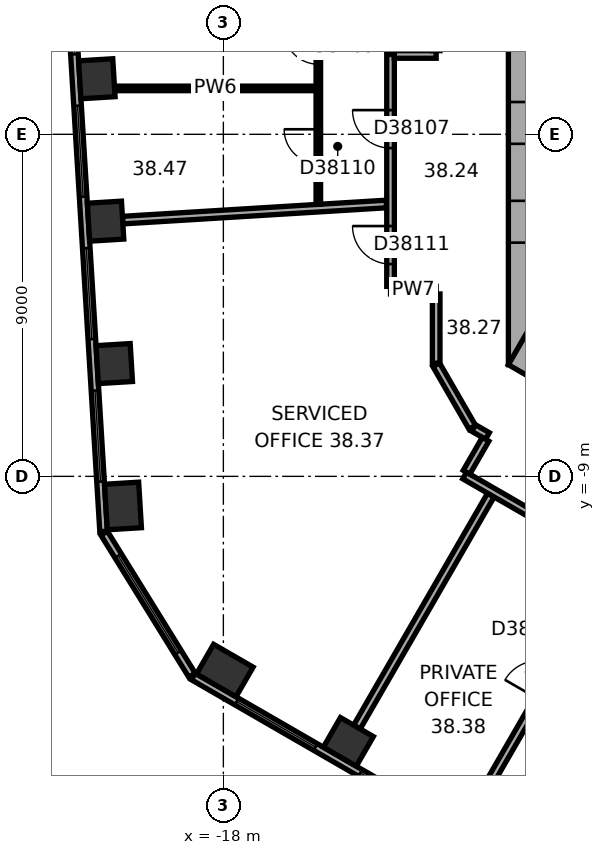
"""IFC4 building model, lengths in metres.
Left out: names, types, materials, properties, quantities, classifications, styles, units other than length and angle.
Written with IfcOpenShell. Run it as: python <this file> out.ifc"""

import sys

from ifc_helpers import new_model, si_unit, direction, frame, frame_2d, origin, origin_2d, place, context, subcontext, project, spatial, rectangle, extrude, element, fill, save


model = new_model("IFC4")
c1 = context("Model", 3, precision=1e-05, world=origin(), true_north=direction((0.0, 1.0)))
c2 = subcontext(c1, "Body", "Model", "MODEL_VIEW")
j1 = project(units=[si_unit("LENGTHUNIT", "METRE"), si_unit("PLANEANGLEUNIT", "RADIAN")], contexts=[c1])
p1 = place(None, origin())
s1 = spatial("IfcSite", under=j1, at=p1, CompositionType="ELEMENT")
p2 = place(p1, origin())
s2 = spatial("IfcBuilding", under=s1, at=p2, CompositionType="ELEMENT")
p3 = place(p2, frame((0.0, 0.0, 157.7)))
s3 = spatial("IfcBuildingStorey", under=s2, at=p3, CompositionType="ELEMENT", Elevation=157.7)
for number, where, z_axis, x_axis in (
    (1, (-21.329, 1.462, 0.0), (0.0, 0.0, 1.0), (0.061, -0.998, 0.0)),
    (2, (-21.1, -2.285, 0.0), (0.0, 0.0, 1.0), (0.061, -0.998, 0.0)),
    (3, (-20.871, -6.032, 0.0), (0.0, 0.0, 1.0), (0.061, -0.998, 0.0)),
):
    element("IfcColumn", number, at=place(p3, frame(where, z_axis=z_axis, x_axis=x_axis)), inside=s3, PredefinedType="COLUMN", context=c2, shape_type="SweptSolid", body=[
        extrude(rectangle(XDim=1.0, YDim=0.9, at=origin_2d()), origin(), (0.0, 0.0, 1.0), 3.7),
    ])
for number, where, z_axis, x_axis in (
    (4, (-20.642, -9.779, 0.0), (0.0, 0.0, 1.0), (0.061, -0.998, 0.0)),
    (5, (-17.962, -14.109, 0.0), (0.0, 0.0, 1.0), (0.866, -0.5, 0.0)),
):
    element("IfcColumn", number, at=place(p3, frame(where, z_axis=z_axis, x_axis=x_axis)), inside=s3, PredefinedType="COLUMN", context=c2, shape_type="SweptSolid", body=[
        extrude(rectangle(XDim=1.2, YDim=0.9, at=origin_2d()), origin(), (0.0, 0.0, 1.0), 3.7),
    ])
p4 = place(p3, frame((-14.711, -15.986, 0.0), z_axis=(0.0, 0.0, 1.0), x_axis=(0.866025403784, -0.5, 0.0)))
e6 = element("IfcColumn", 6, at=p4, inside=s3, PredefinedType="COLUMN", context=c2, shape_type="SweptSolid", body=[
    extrude(rectangle(XDim=1.0, YDim=0.9, at=origin_2d()), origin(), (0.0, 0.0, 1.0), 3.7),
])
p5 = place(p3, frame((-10.0, 6.062, 0.0), z_axis=(0.0, 0.0, 1.0), x_axis=(0.0, -1.0, 0.0)))
e7 = element("IfcWall", 7, at=p5, inside=s3, PredefinedType="SHEAR", context=c2, shape_type="SweptSolid", body=[
    extrude(rectangle(XDim=12.125, YDim=1.0, at=frame_2d((6.062, 0.0))), origin(), (0.0, 0.0, 1.0), 3.7),
])
p6 = place(p5, frame((5.212, 0.0, 0.0)))
e8 = element("IfcOpeningElement", 8, at=p6, cuts=e7, PredefinedType="OPENING", context=c2, shape_type="SweptSolid", body=[
    extrude(rectangle(XDim=1.1, YDim=2.1, at=frame_2d((0.55, 1.05))), frame((0.0, 0.51, 0.0), z_axis=(0.0, -1.0, 0.0), x_axis=(1.0, 0.0, 0.0)), (0.0, 0.0, 1.0), 1.02),
])
p7 = place(p5, frame((7.812, 0.0, 0.0)))
e9 = element("IfcOpeningElement", 9, at=p7, cuts=e7, PredefinedType="OPENING", context=c2, shape_type="SweptSolid", body=[
    extrude(rectangle(XDim=1.1, YDim=2.1, at=frame_2d((0.55, 1.05))), frame((0.0, 0.51, 0.0), z_axis=(0.0, -1.0, 0.0), x_axis=(1.0, 0.0, 0.0)), (0.0, 0.0, 1.0), 1.02),
])
p8 = place(p3, frame((-10.25, -5.629, 0.0), z_axis=(0.0, 0.0, 1.0), x_axis=(0.866022616891, -0.50000482701, 0.0)))
e10 = element("IfcWall", 10, at=p8, inside=s3, PredefinedType="SHEAR", context=c2, shape_type="SweptSolid", body=[
    extrude(rectangle(XDim=12.125, YDim=1.0, at=frame_2d((6.062, 0.0))), origin(), (0.0, 0.0, 1.0), 3.7),
])
p9 = place(p8, frame((6.262, 0.0, 0.0)))
e11 = element("IfcOpeningElement", 11, at=p9, cuts=e10, PredefinedType="OPENING", context=c2, shape_type="SweptSolid", body=[
    extrude(rectangle(XDim=1.5, YDim=2.1, at=frame_2d((0.75, 1.05))), frame((0.0, 0.51, 0.0), z_axis=(0.0, -1.0, 0.0), x_axis=(1.0, 0.0, 0.0)), (0.0, 0.0, 1.0), 1.02),
])
p10 = place(p8, frame((1.712, 0.0, 0.0)))
e12 = element("IfcOpeningElement", 12, at=p10, cuts=e10, PredefinedType="OPENING", context=c2, shape_type="SweptSolid", body=[
    extrude(rectangle(XDim=1.1, YDim=2.1, at=frame_2d((0.55, 1.05))), frame((0.0, 0.51, 0.0), z_axis=(0.0, -1.0, 0.0), x_axis=(1.0, 0.0, 0.0)), (0.0, 0.0, 1.0), 1.02),
])
p11 = place(p8, frame((4.312, 0.0, 0.0)))
e13 = element("IfcOpeningElement", 13, at=p11, cuts=e10, PredefinedType="OPENING", context=c2, shape_type="SweptSolid", body=[
    extrude(rectangle(XDim=1.1, YDim=2.1, at=frame_2d((0.55, 1.05))), frame((0.0, 0.51, 0.0), z_axis=(0.0, -1.0, 0.0), x_axis=(1.0, 0.0, 0.0)), (0.0, 0.0, 1.0), 1.02),
])
p12 = place(p3, frame((-22.375, 9.557, 0.0), z_axis=(0.0, 0.0, 1.0), x_axis=(0.061036015339, -0.998135564356, 0.0)))
e14 = element("IfcWall", 14, at=p12, inside=s3, PredefinedType="STANDARD", context=c2, shape_type="SweptSolid", body=[
    extrude(rectangle(XDim=20.044, YDim=0.2, at=frame_2d((10.022, 0.0))), origin(), (0.0, 0.0, 1.0), 3.7),
])
p13 = place(p12, frame((1.313, 0.0, 0.9)))
e15 = element("IfcOpeningElement", 15, at=p13, cuts=e14, PredefinedType="OPENING", context=c2, shape_type="SweptSolid", body=[
    extrude(rectangle(XDim=2.4, YDim=2.0, at=frame_2d((1.2, 1.0))), frame((0.0, 0.11, 0.0), z_axis=(0.0, -1.0, 0.0), x_axis=(1.0, 0.0, 0.0)), (0.0, 0.0, 1.0), 0.22),
])
p14 = place(p12, frame((5.067, 0.0, 0.9)))
e16 = element("IfcOpeningElement", 16, at=p14, cuts=e14, PredefinedType="OPENING", context=c2, shape_type="SweptSolid", body=[
    extrude(rectangle(XDim=2.4, YDim=2.0, at=frame_2d((1.2, 1.0))), frame((0.0, 0.11, 0.0), z_axis=(0.0, -1.0, 0.0), x_axis=(1.0, 0.0, 0.0)), (0.0, 0.0, 1.0), 0.22),
])
p15 = place(p12, frame((8.821, 0.0, 0.9)))
e17 = element("IfcOpeningElement", 17, at=p15, cuts=e14, PredefinedType="OPENING", context=c2, shape_type="SweptSolid", body=[
    extrude(rectangle(XDim=2.4, YDim=2.0, at=frame_2d((1.2, 1.0))), frame((0.0, 0.11, 0.0), z_axis=(0.0, -1.0, 0.0), x_axis=(1.0, 0.0, 0.0)), (0.0, 0.0, 1.0), 0.22),
])
p16 = place(p12, frame((12.575, 0.0, 0.9)))
e18 = element("IfcOpeningElement", 18, at=p16, cuts=e14, PredefinedType="OPENING", context=c2, shape_type="SweptSolid", body=[
    extrude(rectangle(XDim=2.4, YDim=2.0, at=frame_2d((1.2, 1.0))), frame((0.0, 0.11, 0.0), z_axis=(0.0, -1.0, 0.0), x_axis=(1.0, 0.0, 0.0)), (0.0, 0.0, 1.0), 0.22),
])
p17 = place(p12, frame((16.329, 0.0, 0.9)))
e19 = element("IfcOpeningElement", 19, at=p17, cuts=e14, PredefinedType="OPENING", context=c2, shape_type="SweptSolid", body=[
    extrude(rectangle(XDim=2.4, YDim=2.0, at=frame_2d((1.2, 1.0))), frame((0.0, 0.11, 0.0), z_axis=(0.0, -1.0, 0.0), x_axis=(1.0, 0.0, 0.0)), (0.0, 0.0, 1.0), 0.22),
])
p18 = place(p3, frame((-21.137, -10.496, 0.0), z_axis=(0.0, 0.0, 1.0), x_axis=(0.526178661629, -0.850374044786, 0.0)))
e20 = element("IfcWall", 20, at=p18, inside=s3, PredefinedType="STANDARD", context=c2, shape_type="SweptSolid", body=[
    extrude(rectangle(XDim=4.395, YDim=0.2, at=frame_2d((2.197, 0.0))), origin(), (0.0, 0.0, 1.0), 3.7),
])
p19 = place(p18, frame((0.698, 0.0, 0.9)))
e21 = element("IfcOpeningElement", 21, at=p19, cuts=e20, PredefinedType="OPENING", context=c2, shape_type="SweptSolid", body=[
    extrude(rectangle(XDim=3.0, YDim=2.0, at=frame_2d((1.5, 1.0))), frame((0.0, 0.11, 0.0), z_axis=(0.0, -1.0, 0.0), x_axis=(1.0, 0.0, 0.0)), (0.0, 0.0, 1.0), 0.22),
])
p20 = place(p3, frame((-18.789, -14.267, 0.0), z_axis=(0.0, 0.0, 1.0), x_axis=(0.866023315909, -0.500003616288, 0.0)))
e22 = element("IfcWall", 22, at=p20, inside=s3, PredefinedType="STANDARD", context=c2, shape_type="SweptSolid", body=[
    extrude(rectangle(XDim=20.044, YDim=0.2, at=frame_2d((10.022, 0.0))), origin(), (0.0, 0.0, 1.0), 3.7),
])
p21 = place(p20, frame((1.314, 0.0, 0.9)))
e23 = element("IfcOpeningElement", 23, at=p21, cuts=e22, PredefinedType="OPENING", context=c2, shape_type="SweptSolid", body=[
    extrude(rectangle(XDim=2.4, YDim=2.0, at=frame_2d((1.2, 1.0))), frame((0.0, 0.11, 0.0), z_axis=(0.0, -1.0, 0.0), x_axis=(1.0, 0.0, 0.0)), (0.0, 0.0, 1.0), 0.22),
])
p22 = place(p20, frame((5.069, 0.0, 0.9)))
e24 = element("IfcOpeningElement", 24, at=p22, cuts=e22, PredefinedType="OPENING", context=c2, shape_type="SweptSolid", body=[
    extrude(rectangle(XDim=2.4, YDim=2.0, at=frame_2d((1.2, 1.0))), frame((0.0, 0.11, 0.0), z_axis=(0.0, -1.0, 0.0), x_axis=(1.0, 0.0, 0.0)), (0.0, 0.0, 1.0), 0.22),
])
p23 = place(p20, frame((8.823, 0.0, 0.9)))
e25 = element("IfcOpeningElement", 25, at=p23, cuts=e22, PredefinedType="OPENING", context=c2, shape_type="SweptSolid", body=[
    extrude(rectangle(XDim=2.4, YDim=2.0, at=frame_2d((1.2, 1.0))), frame((0.0, 0.11, 0.0), z_axis=(0.0, -1.0, 0.0), x_axis=(1.0, 0.0, 0.0)), (0.0, 0.0, 1.0), 0.22),
])
p24 = place(p20, frame((12.577, 0.0, 0.9)))
e26 = element("IfcOpeningElement", 26, at=p24, cuts=e22, PredefinedType="OPENING", context=c2, shape_type="SweptSolid", body=[
    extrude(rectangle(XDim=2.4, YDim=2.0, at=frame_2d((1.2, 1.0))), frame((0.0, 0.11, 0.0), z_axis=(0.0, -1.0, 0.0), x_axis=(1.0, 0.0, 0.0)), (0.0, 0.0, 1.0), 0.22),
])
p25 = place(p20, frame((16.331, 0.0, 0.9)))
e27 = element("IfcOpeningElement", 27, at=p25, cuts=e22, PredefinedType="OPENING", context=c2, shape_type="SweptSolid", body=[
    extrude(rectangle(XDim=2.4, YDim=2.0, at=frame_2d((1.2, 1.0))), frame((0.0, 0.11, 0.0), z_axis=(0.0, -1.0, 0.0), x_axis=(1.0, 0.0, 0.0)), (0.0, 0.0, 1.0), 0.22),
])
p26 = place(p3, frame((-20.863, 1.208, 0.0), z_axis=(0.0, 0.0, 1.0), x_axis=(1.0, 0.0, 0.0)))
e28 = element("IfcWall", 28, at=p26, inside=s3, PredefinedType="PARTITIONING", context=c2, shape_type="SweptSolid", body=[
    extrude(rectangle(XDim=5.302, YDim=0.12, at=frame_2d((2.651, 0.0))), origin(), (0.0, 0.0, 1.0), 2.87),
])
p27 = place(p3, frame((-20.651, -2.258, 0.0), z_axis=(0.0, 0.0, 1.0), x_axis=(0.998133960965, 0.061062230286, 0.0)))
e29 = element("IfcWall", 29, at=p27, inside=s3, PredefinedType="PARTITIONING", context=c2, shape_type="SweptSolid", body=[
    extrude(rectangle(XDim=6.953, YDim=0.2, at=frame_2d((3.477, 0.0))), origin(), (0.0, 0.0, 1.0), 3.42),
])
p28 = place(p3, frame((-15.501, 5.479, 0.0), z_axis=(0.0, 0.0, 1.0), x_axis=(0.0, -1.0, 0.0)))
e30 = element("IfcWall", 30, at=p28, inside=s3, PredefinedType="PARTITIONING", context=c2, shape_type="SweptSolid", body=[
    extrude(rectangle(XDim=7.322, YDim=0.12, at=frame_2d((3.661, 0.0))), origin(), (0.0, 0.0, 1.0), 3.42),
])
p29 = place(p28, frame((0.55, 0.0, 0.0)))
e31 = element("IfcOpeningElement", 31, at=p29, cuts=e30, PredefinedType="OPENING", context=c2, shape_type="SweptSolid", body=[
    extrude(rectangle(XDim=1.0, YDim=2.1, at=frame_2d((0.5, 1.05))), frame((0.0, 0.07, 0.0), z_axis=(0.0, -1.0, 0.0), x_axis=(1.0, 0.0, 0.0)), (0.0, 0.0, 1.0), 0.14),
])
p30 = place(p28, frame((2.736, 0.0, 0.0)))
e32 = element("IfcOpeningElement", 32, at=p30, cuts=e30, PredefinedType="OPENING", context=c2, shape_type="SweptSolid", body=[
    extrude(rectangle(XDim=0.9, YDim=2.1, at=frame_2d((0.45, 1.05))), frame((0.0, 0.07, 0.0), z_axis=(0.0, -1.0, 0.0), x_axis=(1.0, 0.0, 0.0)), (0.0, 0.0, 1.0), 0.14),
])
p31 = place(p28, frame((5.347, 0.0, 0.0)))
e33 = element("IfcOpeningElement", 33, at=p31, cuts=e30, PredefinedType="OPENING", context=c2, shape_type="SweptSolid", body=[
    extrude(rectangle(XDim=0.9, YDim=2.1, at=frame_2d((0.45, 1.05))), frame((0.0, 0.07, 0.0), z_axis=(0.0, -1.0, 0.0), x_axis=(1.0, 0.0, 0.0)), (0.0, 0.0, 1.0), 0.14),
])
p32 = place(p3, frame((-14.486, -15.597, 0.0), z_axis=(0.0, 0.0, 1.0), x_axis=(0.499983284935, 0.866035054017, 0.0)))
e34 = element("IfcWall", 34, at=p32, inside=s3, PredefinedType="PARTITIONING", context=c2, shape_type="SweptSolid", body=[
    extrude(rectangle(XDim=7.049, YDim=0.2, at=frame_2d((3.524, 0.0))), origin(), (0.0, 0.0, 1.0), 3.42),
])
p33 = place(p3, frame((-13.601, -4.101, 0.0), z_axis=(0.0, 0.0, 1.0), x_axis=(1.0, 0.0, 0.0)))
e35 = element("IfcWall", 35, at=p33, inside=s3, PredefinedType="PARTITIONING", context=c2, shape_type="SweptSolid", body=[
    extrude(rectangle(XDim=1.201, YDim=0.2, at=frame_2d((0.601, 0.0))), origin(), (0.0, 0.0, 1.0), 3.42),
])
p34 = place(p3, frame((-13.601, 2.101, 0.0), z_axis=(0.0, 0.0, 1.0), x_axis=(0.0, -1.0, 0.0)))
e36 = element("IfcWall", 36, at=p34, inside=s3, PredefinedType="PARTITIONING", context=c2, shape_type="SweptSolid", body=[
    extrude(rectangle(XDim=6.102, YDim=0.2, at=frame_2d((3.051, 0.0))), origin(), (0.0, 0.0, 1.0), 3.42),
])
p35 = place(p34, frame((1.464, 0.0, 0.0)))
e37 = element("IfcOpeningElement", 37, at=p35, cuts=e36, PredefinedType="OPENING", context=c2, shape_type="SweptSolid", body=[
    extrude(rectangle(XDim=1.0, YDim=2.1, at=frame_2d((0.5, 1.05))), frame((0.0, 0.11, 0.0), z_axis=(0.0, -1.0, 0.0), x_axis=(1.0, 0.0, 0.0)), (0.0, 0.0, 1.0), 0.22),
])
p36 = place(p34, frame((4.515, 0.0, 0.0)))
e38 = element("IfcOpeningElement", 38, at=p36, cuts=e36, PredefinedType="OPENING", context=c2, shape_type="SweptSolid", body=[
    extrude(rectangle(XDim=1.0, YDim=2.1, at=frame_2d((0.5, 1.05))), frame((0.0, 0.11, 0.0), z_axis=(0.0, -1.0, 0.0), x_axis=(1.0, 0.0, 0.0)), (0.0, 0.0, 1.0), 0.22),
])
p37 = place(p3, frame((-12.4, -6.062, 0.0), z_axis=(0.0, 0.0, 1.0), x_axis=(0.500022797313, -0.86601224135, 0.0)))
e39 = element("IfcWall", 39, at=p37, inside=s3, PredefinedType="PARTITIONING", context=c2, shape_type="SweptSolid", body=[
    extrude(rectangle(XDim=1.9, YDim=0.2, at=frame_2d((0.95, 0.0))), origin(), (0.0, 0.0, 1.0), 3.42),
])
p38 = place(p3, frame((-12.4, -4.201, 0.0), z_axis=(0.0, 0.0, 1.0), x_axis=(0.0, -1.0, 0.0)))
e40 = element("IfcWall", 40, at=p38, inside=s3, PredefinedType="PARTITIONING", context=c2, shape_type="SweptSolid", body=[
    extrude(rectangle(XDim=1.821, YDim=0.2, at=frame_2d((0.911, 0.0))), origin(), (0.0, 0.0, 1.0), 3.42),
])
p39 = place(p3, frame((-12.4, 2.101, 0.0), z_axis=(0.0, 0.0, 1.0), x_axis=(-1.0, 0.0, 0.0)))
e41 = element("IfcWall", 41, at=p39, inside=s3, PredefinedType="PARTITIONING", context=c2, shape_type="SweptSolid", body=[
    extrude(rectangle(XDim=1.101, YDim=0.2, at=frame_2d((0.551, 0.0))), origin(), (0.0, 0.0, 1.0), 3.42),
])
p40 = place(p3, frame((-11.651, -8.978, 0.0), z_axis=(0.0, 0.0, 1.0), x_axis=(0.866010893236, -0.500025132165, 0.0)))
e42 = element("IfcWall", 42, at=p40, inside=s3, PredefinedType="PARTITIONING", context=c2, shape_type="SweptSolid", body=[
    extrude(rectangle(XDim=4.608, YDim=0.2, at=frame_2d((2.304, 0.0))), origin(), (0.0, 0.0, 1.0), 3.42),
])
p41 = place(p3, frame((-11.415, -7.728, 0.0), z_axis=(0.0, 0.0, 1.0), x_axis=(0.865915281873, -0.500190688257, 0.0)))
e43 = element("IfcWall", 43, at=p41, inside=s3, PredefinedType="PARTITIONING", context=c2, shape_type="SweptSolid", body=[
    extrude(rectangle(XDim=0.421, YDim=0.2, at=frame_2d((0.21, 0.0))), origin(), (0.0, 0.0, 1.0), 3.42),
])
p42 = place(p3, frame((-11.235, -17.474, 0.0), z_axis=(0.0, 0.0, 1.0), x_axis=(0.500009260695, 0.866020057054, 0.0)))
e44 = element("IfcWall", 44, at=p42, inside=s3, PredefinedType="PARTITIONING", context=c2, shape_type="SweptSolid", body=[
    extrude(rectangle(XDim=7.049, YDim=0.2, at=frame_2d((3.524, 0.0))), origin(), (0.0, 0.0, 1.0), 2.87),
])
p43 = place(p42, frame((3.024, 0.0, 0.0)))
e45 = element("IfcOpeningElement", 45, at=p43, cuts=e44, PredefinedType="OPENING", context=c2, shape_type="SweptSolid", body=[
    extrude(rectangle(XDim=1.0, YDim=2.1, at=frame_2d((0.5, 1.05))), frame((0.0, 0.11, 0.0), z_axis=(0.0, -1.0, 0.0), x_axis=(1.0, 0.0, 0.0)), (0.0, 0.0, 1.0), 0.22),
])
p44 = place(p3, frame((-11.101, -8.025, 0.0), z_axis=(0.0, 0.0, 1.0), x_axis=(-0.500074377092, -0.865982457891, 0.0)))
e46 = element("IfcWall", 46, at=p44, inside=s3, PredefinedType="PARTITIONING", context=c2, shape_type="SweptSolid", body=[
    extrude(rectangle(XDim=1.001, YDim=0.2, at=frame_2d((0.5, 0.0))), origin(), (0.0, 0.0, 1.0), 3.42),
])
p45 = place(p14, origin())
e47 = element("IfcWindow", 47, at=p45, inside=s3, PartitioningType="SINGLE_PANEL", PredefinedType="WINDOW", context=c2, shape_type="SweptSolid", body=[
    extrude(rectangle(XDim=2.4, YDim=2.0, at=frame_2d((1.2, 1.0))), frame((0.0, 0.03, 0.0), z_axis=(0.0, -1.0, 0.0), x_axis=(1.0, 0.0, 0.0)), (0.0, 0.0, 1.0), 0.06),
])
fill(e16, e47)
p46 = place(p15, origin())
e48 = element("IfcWindow", 48, at=p46, inside=s3, PartitioningType="SINGLE_PANEL", PredefinedType="WINDOW", context=c2, shape_type="SweptSolid", body=[
    extrude(rectangle(XDim=2.4, YDim=2.0, at=frame_2d((1.2, 1.0))), frame((0.0, 0.03, 0.0), z_axis=(0.0, -1.0, 0.0), x_axis=(1.0, 0.0, 0.0)), (0.0, 0.0, 1.0), 0.06),
])
fill(e17, e48)
p47 = place(p16, origin())
e49 = element("IfcWindow", 49, at=p47, inside=s3, PartitioningType="SINGLE_PANEL", PredefinedType="WINDOW", context=c2, shape_type="SweptSolid", body=[
    extrude(rectangle(XDim=2.4, YDim=2.0, at=frame_2d((1.2, 1.0))), frame((0.0, 0.03, 0.0), z_axis=(0.0, -1.0, 0.0), x_axis=(1.0, 0.0, 0.0)), (0.0, 0.0, 1.0), 0.06),
])
fill(e18, e49)
p48 = place(p17, origin())
e50 = element("IfcWindow", 50, at=p48, inside=s3, PartitioningType="SINGLE_PANEL", PredefinedType="WINDOW", context=c2, shape_type="SweptSolid", body=[
    extrude(rectangle(XDim=2.4, YDim=2.0, at=frame_2d((1.2, 1.0))), frame((0.0, 0.03, 0.0), z_axis=(0.0, -1.0, 0.0), x_axis=(1.0, 0.0, 0.0)), (0.0, 0.0, 1.0), 0.06),
])
fill(e19, e50)
p49 = place(p19, origin())
e51 = element("IfcWindow", 51, at=p49, inside=s3, PartitioningType="SINGLE_PANEL", PredefinedType="WINDOW", context=c2, shape_type="SweptSolid", body=[
    extrude(rectangle(XDim=3.0, YDim=2.0, at=frame_2d((1.5, 1.0))), frame((0.0, 0.03, 0.0), z_axis=(0.0, -1.0, 0.0), x_axis=(1.0, 0.0, 0.0)), (0.0, 0.0, 1.0), 0.06),
])
fill(e21, e51)
p50 = place(p21, origin())
e52 = element("IfcWindow", 52, at=p50, inside=s3, PartitioningType="SINGLE_PANEL", PredefinedType="WINDOW", context=c2, shape_type="SweptSolid", body=[
    extrude(rectangle(XDim=2.4, YDim=2.0, at=frame_2d((1.2, 1.0))), frame((0.0, 0.03, 0.0), z_axis=(0.0, -1.0, 0.0), x_axis=(1.0, 0.0, 0.0)), (0.0, 0.0, 1.0), 0.06),
])
fill(e23, e52)
p51 = place(p22, origin())
e53 = element("IfcWindow", 53, at=p51, inside=s3, PartitioningType="SINGLE_PANEL", PredefinedType="WINDOW", context=c2, shape_type="SweptSolid", body=[
    extrude(rectangle(XDim=2.4, YDim=2.0, at=frame_2d((1.2, 1.0))), frame((0.0, 0.03, 0.0), z_axis=(0.0, -1.0, 0.0), x_axis=(1.0, 0.0, 0.0)), (0.0, 0.0, 1.0), 0.06),
])
fill(e24, e53)
p52 = place(p35, origin())
e54 = element("IfcDoor", 54, at=p52, inside=s3, OperationType="SINGLE_SWING_LEFT", PredefinedType="DOOR", context=c2, shape_type="SweptSolid", body=[
    extrude(rectangle(XDim=1.0, YDim=2.1, at=frame_2d((0.5, 1.05))), frame((0.0, 0.025, 0.0), z_axis=(0.0, -1.0, 0.0), x_axis=(1.0, 0.0, 0.0)), (0.0, 0.0, 1.0), 0.05),
])
fill(e37, e54)
p53 = place(p30, origin())
e55 = element("IfcDoor", 55, at=p53, inside=s3, OperationType="SINGLE_SWING_LEFT", PredefinedType="DOOR", context=c2, shape_type="SweptSolid", body=[
    extrude(rectangle(XDim=0.9, YDim=2.1, at=frame_2d((0.45, 1.05))), frame((0.0, 0.025, 0.0), z_axis=(0.0, -1.0, 0.0), x_axis=(1.0, 0.0, 0.0)), (0.0, 0.0, 1.0), 0.05),
])
fill(e32, e55)
p54 = place(p31, origin())
e56 = element("IfcDoor", 56, at=p54, inside=s3, OperationType="SINGLE_SWING_LEFT", PredefinedType="DOOR", context=c2, shape_type="SweptSolid", body=[
    extrude(rectangle(XDim=0.9, YDim=2.1, at=frame_2d((0.45, 1.05))), frame((0.0, 0.025, 0.0), z_axis=(0.0, -1.0, 0.0), x_axis=(1.0, 0.0, 0.0)), (0.0, 0.0, 1.0), 0.05),
])
fill(e33, e56)
p55 = place(p36, origin())
e57 = element("IfcDoor", 57, at=p55, inside=s3, OperationType="SINGLE_SWING_LEFT", PredefinedType="DOOR", context=c2, shape_type="SweptSolid", body=[
    extrude(rectangle(XDim=1.0, YDim=2.1, at=frame_2d((0.5, 1.05))), frame((0.0, 0.025, 0.0), z_axis=(0.0, -1.0, 0.0), x_axis=(1.0, 0.0, 0.0)), (0.0, 0.0, 1.0), 0.05),
])
fill(e38, e57)
save(model, sys.argv[1])
